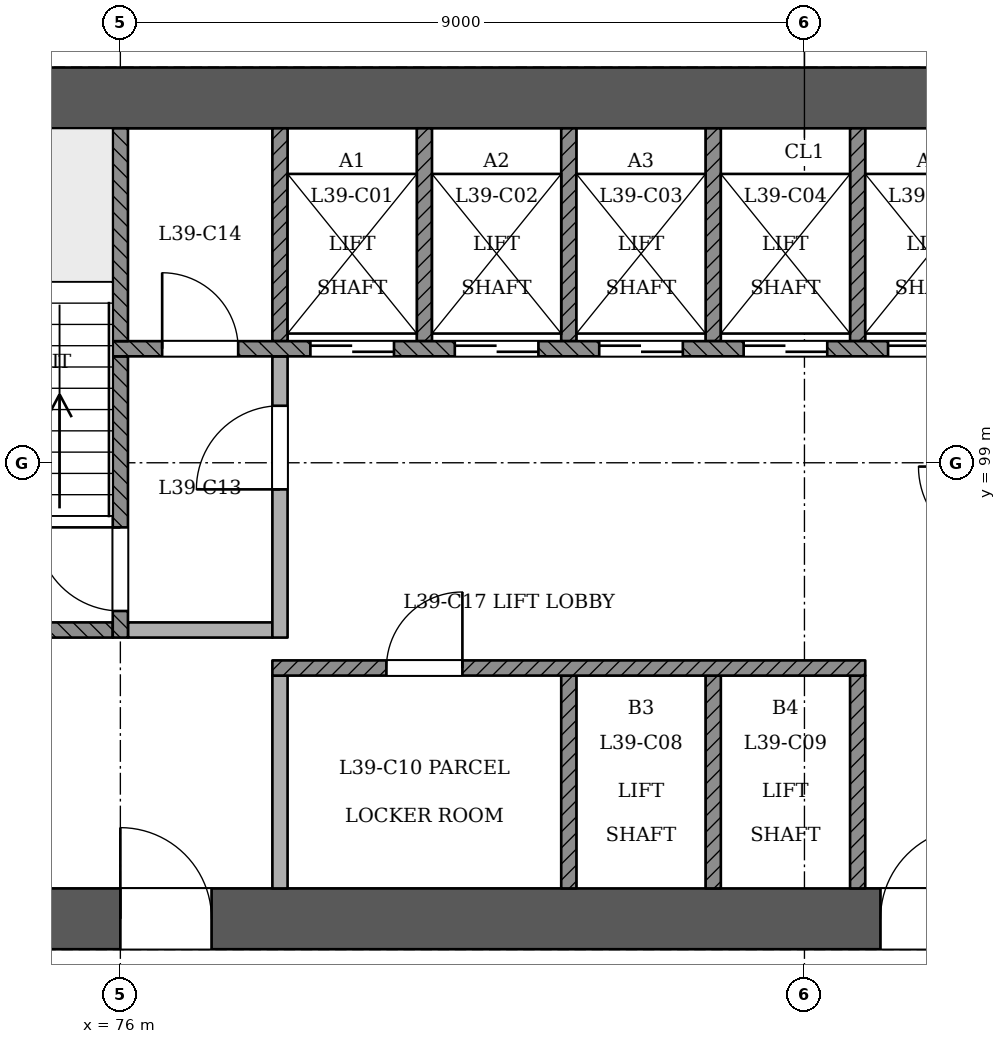
"""IFC4 building model, lengths in metres.
Left out: names, types, materials, properties, quantities, classifications, styles, units other than length and angle.
Written with IfcOpenShell. Run it as: python <this file> out.ifc"""

import sys

from ifc_helpers import new_model, si_unit, direction, frame, frame_2d, origin, place, context, subcontext, project, spatial, rectangle, extrude, element, fill, save


model = new_model("IFC4")
c1 = context("Model", 3, precision=1e-05, world=origin(), true_north=direction((0.0, 1.0)))
c2 = subcontext(c1, "Body", "Model", "MODEL_VIEW")
j1 = project(units=[si_unit("LENGTHUNIT", "METRE"), si_unit("PLANEANGLEUNIT", "RADIAN")], contexts=[c1])
p1 = place(None, origin())
s1 = spatial("IfcSite", under=j1, at=p1, CompositionType="ELEMENT")
p2 = place(p1, origin())
s2 = spatial("IfcBuilding", under=s1, at=p2, CompositionType="ELEMENT")
p3 = place(p2, frame((0.0, 0.0, 153.0)))
s3 = spatial("IfcBuildingStorey", under=s2, at=p3, CompositionType="ELEMENT", Elevation=153.0)
p4 = place(p3, frame((72.6, 93.0, 0.0), z_axis=(0.0, 0.0, 1.0), x_axis=(1.0, 0.0, 0.0)))
e1 = element("IfcWall", 1, at=p4, inside=s3, PredefinedType="SHEAR", context=c2, shape_type="SweptSolid", body=[
    extrude(rectangle(XDim=25.2, YDim=0.8, at=frame_2d((12.6, 0.0))), origin(), (0.0, 0.0, 1.0), 3.6),
])
p5 = place(p4, frame((1.2, 0.0, 0.0)))
e2 = element("IfcOpeningElement", 2, at=p5, cuts=e1, PredefinedType="OPENING", context=c2, shape_type="SweptSolid", body=[
    extrude(rectangle(XDim=1.2, YDim=2.1, at=frame_2d((0.6, 1.05))), frame((0.0, 0.411, 0.0), z_axis=(0.0, -1.0, 0.0), x_axis=(1.0, 0.0, 0.0)), (0.0, 0.0, 1.0), 0.821),
])
p6 = place(p4, frame((3.4, 0.0, 0.0)))
e3 = element("IfcOpeningElement", 3, at=p6, cuts=e1, PredefinedType="OPENING", context=c2, shape_type="SweptSolid", body=[
    extrude(rectangle(XDim=1.2, YDim=2.1, at=frame_2d((0.6, 1.05))), frame((0.0, 0.411, 0.0), z_axis=(0.0, -1.0, 0.0), x_axis=(1.0, 0.0, 0.0)), (0.0, 0.0, 1.0), 0.821),
])
p7 = place(p4, frame((13.4, 0.0, 0.0)))
e4 = element("IfcOpeningElement", 4, at=p7, cuts=e1, PredefinedType="OPENING", context=c2, shape_type="SweptSolid", body=[
    extrude(rectangle(XDim=1.2, YDim=2.1, at=frame_2d((0.6, 1.05))), frame((0.0, 0.411, 0.0), z_axis=(0.0, -1.0, 0.0), x_axis=(1.0, 0.0, 0.0)), (0.0, 0.0, 1.0), 0.821),
])
p8 = place(p4, frame((15.712, 0.0, 0.0)))
e5 = element("IfcOpeningElement", 5, at=p8, cuts=e1, PredefinedType="OPENING", context=c2, shape_type="SweptSolid", body=[
    extrude(rectangle(XDim=1.0, YDim=2.1, at=frame_2d((0.5, 1.05))), frame((0.0, 0.411, 0.0), z_axis=(0.0, -1.0, 0.0), x_axis=(1.0, 0.0, 0.0)), (0.0, 0.0, 1.0), 0.821),
])
p9 = place(p4, frame((19.15, 0.0, 0.0)))
e6 = element("IfcOpeningElement", 6, at=p9, cuts=e1, PredefinedType="OPENING", context=c2, shape_type="SweptSolid", body=[
    extrude(rectangle(XDim=1.0, YDim=2.1, at=frame_2d((0.5, 1.05))), frame((0.0, 0.411, 0.0), z_axis=(0.0, -1.0, 0.0), x_axis=(1.0, 0.0, 0.0)), (0.0, 0.0, 1.0), 0.821),
])
p10 = place(p4, frame((22.688, 0.0, 0.0)))
e7 = element("IfcOpeningElement", 7, at=p10, cuts=e1, PredefinedType="OPENING", context=c2, shape_type="SweptSolid", body=[
    extrude(rectangle(XDim=1.0, YDim=2.1, at=frame_2d((0.5, 1.05))), frame((0.0, 0.411, 0.0), z_axis=(0.0, -1.0, 0.0), x_axis=(1.0, 0.0, 0.0)), (0.0, 0.0, 1.0), 0.821),
])
p11 = place(p3, frame((97.4, 103.8, 0.0), z_axis=(0.0, 0.0, 1.0), x_axis=(-1.0, 0.0, 0.0)))
e8 = element("IfcWall", 8, at=p11, inside=s3, PredefinedType="SHEAR", context=c2, shape_type="SweptSolid", body=[
    extrude(rectangle(XDim=25.2, YDim=0.8, at=frame_2d((12.6, 0.0))), origin(), (0.0, 0.0, 1.0), 3.6),
])
p12 = place(p3, frame((66.242, 97.188, 0.0), z_axis=(0.0, 0.0, 1.0), x_axis=(0.500002614046, -0.866023894559, 0.0)))
e9 = element("IfcWall", 9, at=p12, inside=s3, PredefinedType="PARTITIONING", context=c2, shape_type="SweptSolid", body=[
    extrude(rectangle(XDim=37.515, YDim=0.15, at=frame_2d((18.758, 0.0))), origin(), (0.0, 0.0, 1.0), 2.75),
])
p13 = place(p12, frame((2.8, 0.0, 0.0)))
e10 = element("IfcOpeningElement", 10, at=p13, cuts=e9, PredefinedType="OPENING", context=c2, shape_type="SweptSolid", body=[
    extrude(rectangle(XDim=1.2, YDim=2.1, at=frame_2d((0.6, 1.05))), frame((0.0, 0.085, 0.0), z_axis=(0.0, -1.0, 0.0), x_axis=(1.0, 0.0, 0.0)), (0.0, 0.0, 1.0), 0.171),
])
p14 = place(p12, frame((11.8, 0.0, 0.0)))
e11 = element("IfcOpeningElement", 11, at=p14, cuts=e9, PredefinedType="OPENING", context=c2, shape_type="SweptSolid", body=[
    extrude(rectangle(XDim=1.2, YDim=2.1, at=frame_2d((0.6, 1.05))), frame((0.0, 0.085, 0.0), z_axis=(0.0, -1.0, 0.0), x_axis=(1.0, 0.0, 0.0)), (0.0, 0.0, 1.0), 0.171),
])
p15 = place(p12, frame((24.15, 0.0, 0.0)))
e12 = element("IfcOpeningElement", 12, at=p15, cuts=e9, PredefinedType="OPENING", context=c2, shape_type="SweptSolid", body=[
    extrude(rectangle(XDim=1.2, YDim=2.1, at=frame_2d((0.6, 1.05))), frame((0.0, 0.085, 0.0), z_axis=(0.0, -1.0, 0.0), x_axis=(1.0, 0.0, 0.0)), (0.0, 0.0, 1.0), 0.171),
])
p16 = place(p12, frame((33.25, 0.0, 0.0)))
e13 = element("IfcOpeningElement", 13, at=p16, cuts=e9, PredefinedType="OPENING", context=c2, shape_type="SweptSolid", body=[
    extrude(rectangle(XDim=1.0, YDim=2.1, at=frame_2d((0.5, 1.05))), frame((0.0, 0.085, 0.0), z_axis=(0.0, -1.0, 0.0), x_axis=(1.0, 0.0, 0.0)), (0.0, 0.0, 1.0), 0.171),
])
p17 = place(p3, frame((85.065, 64.811, 0.0), z_axis=(0.0, 0.0, 1.0), x_axis=(0.500003399299, 0.866023441189, 0.0)))
e14 = element("IfcWall", 14, at=p17, inside=s3, PredefinedType="PARTITIONING", context=c2, shape_type="SweptSolid", body=[
    extrude(rectangle(XDim=37.385, YDim=0.15, at=frame_2d((18.693, 0.0))), origin(), (0.0, 0.0, 1.0), 2.75),
])
p18 = place(p17, frame((0.524, 0.0, 0.0)))
e15 = element("IfcOpeningElement", 15, at=p18, cuts=e14, PredefinedType="OPENING", context=c2, shape_type="SweptSolid", body=[
    extrude(rectangle(XDim=1.2, YDim=2.1, at=frame_2d((0.6, 1.05))), frame((0.0, 0.085, 0.0), z_axis=(0.0, -1.0, 0.0), x_axis=(1.0, 0.0, 0.0)), (0.0, 0.0, 1.0), 0.171),
])
p19 = place(p17, frame((12.036, 0.0, 0.0)))
e16 = element("IfcOpeningElement", 16, at=p19, cuts=e14, PredefinedType="OPENING", context=c2, shape_type="SweptSolid", body=[
    extrude(rectangle(XDim=1.2, YDim=2.1, at=frame_2d((0.6, 1.05))), frame((0.0, 0.085, 0.0), z_axis=(0.0, -1.0, 0.0), x_axis=(1.0, 0.0, 0.0)), (0.0, 0.0, 1.0), 0.171),
])
p20 = place(p17, frame((22.186, 0.0, 0.0)))
e17 = element("IfcOpeningElement", 17, at=p20, cuts=e14, PredefinedType="OPENING", context=c2, shape_type="SweptSolid", body=[
    extrude(rectangle(XDim=1.2, YDim=2.1, at=frame_2d((0.6, 1.05))), frame((0.0, 0.085, 0.0), z_axis=(0.0, -1.0, 0.0), x_axis=(1.0, 0.0, 0.0)), (0.0, 0.0, 1.0), 0.171),
])
p21 = place(p17, frame((31.186, 0.0, 0.0)))
e18 = element("IfcOpeningElement", 18, at=p21, cuts=e14, PredefinedType="OPENING", context=c2, shape_type="SweptSolid", body=[
    extrude(rectangle(XDim=1.2, YDim=2.1, at=frame_2d((0.6, 1.05))), frame((0.0, 0.085, 0.0), z_axis=(0.0, -1.0, 0.0), x_axis=(1.0, 0.0, 0.0)), (0.0, 0.0, 1.0), 0.171),
])
p22 = place(p3, frame((78.1, 93.4, 0.0), z_axis=(0.0, 0.0, 1.0), x_axis=(0.0, 1.0, 0.0)))
e19 = element("IfcWall", 19, at=p22, inside=s3, PredefinedType="PARTITIONING", context=c2, shape_type="SweptSolid", body=[
    extrude(rectangle(XDim=2.8, YDim=0.2, at=frame_2d((1.4, 0.0))), origin(), (0.0, 0.0, 1.0), 3.15),
])
for number, where, z_axis, x_axis in (
    (20, (81.9, 93.4, 0.0), (0.0, 0.0, 1.0), (0.0, 1.0, 0.0)),
    (21, (83.8, 93.4, 0.0), (0.0, 0.0, 1.0), (0.0, 1.0, 0.0)),
    (22, (85.7, 93.4, 0.0), (0.0, 0.0, 1.0), (0.0, 1.0, 0.0)),
):
    element("IfcWall", number, at=place(p3, frame(where, z_axis=z_axis, x_axis=x_axis)), inside=s3, PredefinedType="SOLIDWALL", context=c2, shape_type="SweptSolid", body=[
        extrude(rectangle(XDim=2.8, YDim=0.2, at=frame_2d((1.4, 0.0))), origin(), (0.0, 0.0, 1.0), 3.15),
    ])
p23 = place(p3, frame((78.0, 96.3, 0.0), z_axis=(0.0, 0.0, 1.0), x_axis=(1.0, 0.0, 0.0)))
e23 = element("IfcWall", 23, at=p23, inside=s3, PredefinedType="SOLIDWALL", context=c2, shape_type="SweptSolid", body=[
    extrude(rectangle(XDim=7.8, YDim=0.2, at=frame_2d((3.9, 0.0))), origin(), (0.0, 0.0, 1.0), 3.15),
])
p24 = place(p23, frame((1.5, 0.0, 0.0)))
e24 = element("IfcOpeningElement", 24, at=p24, cuts=e23, PredefinedType="OPENING", context=c2, shape_type="SweptSolid", body=[
    extrude(rectangle(XDim=1.0, YDim=2.1, at=frame_2d((0.5, 1.05))), frame((0.0, 0.11, 0.0), z_axis=(0.0, -1.0, 0.0), x_axis=(1.0, 0.0, 0.0)), (0.0, 0.0, 1.0), 0.221),
])
p25 = place(p3, frame((73.0, 96.8, 0.0), z_axis=(0.0, 0.0, 1.0), x_axis=(1.0, 0.0, 0.0)))
e25 = element("IfcWall", 25, at=p25, inside=s3, PredefinedType="SOLIDWALL", context=c2, shape_type="SweptSolid", body=[
    extrude(rectangle(XDim=2.9, YDim=0.2, at=frame_2d((1.45, 0.0))), origin(), (0.0, 0.0, 1.0), 3.15),
])
p26 = place(p3, frame((76.0, 96.7, 0.0), z_axis=(0.0, 0.0, 1.0), x_axis=(0.0, 1.0, 0.0)))
e26 = element("IfcWall", 26, at=p26, inside=s3, PredefinedType="SOLIDWALL", context=c2, shape_type="SweptSolid", body=[
    extrude(rectangle(XDim=3.7, YDim=0.2, at=frame_2d((1.85, 0.0))), origin(), (0.0, 0.0, 1.0), 3.15),
])
p27 = place(p26, frame((0.35, 0.0, 0.0)))
e27 = element("IfcOpeningElement", 27, at=p27, cuts=e26, PredefinedType="OPENING", context=c2, shape_type="SweptSolid", body=[
    extrude(rectangle(XDim=1.1, YDim=2.1, at=frame_2d((0.55, 1.05))), frame((0.0, 0.11, 0.0), z_axis=(0.0, -1.0, 0.0), x_axis=(1.0, 0.0, 0.0)), (0.0, 0.0, 1.0), 0.221),
])
p28 = place(p3, frame((76.1, 96.8, 0.0), z_axis=(0.0, 0.0, 1.0), x_axis=(1.0, 0.0, 0.0)))
e28 = element("IfcWall", 28, at=p28, inside=s3, PredefinedType="PARTITIONING", context=c2, shape_type="SweptSolid", body=[
    extrude(rectangle(XDim=1.9, YDim=0.2, at=frame_2d((0.95, 0.0))), origin(), (0.0, 0.0, 1.0), 3.15),
])
p29 = place(p3, frame((78.1, 96.7, 0.0), z_axis=(0.0, 0.0, 1.0), x_axis=(0.0, 1.0, 0.0)))
e29 = element("IfcWall", 29, at=p29, inside=s3, PredefinedType="PARTITIONING", context=c2, shape_type="SweptSolid", body=[
    extrude(rectangle(XDim=3.7, YDim=0.2, at=frame_2d((1.85, 0.0))), origin(), (0.0, 0.0, 1.0), 3.15),
])
p30 = place(p29, frame((1.95, 0.0, 0.0)))
e30 = element("IfcOpeningElement", 30, at=p30, cuts=e29, PredefinedType="OPENING", context=c2, shape_type="SweptSolid", body=[
    extrude(rectangle(XDim=1.1, YDim=2.1, at=frame_2d((0.55, 1.05))), frame((0.0, 0.11, 0.0), z_axis=(0.0, -1.0, 0.0), x_axis=(1.0, 0.0, 0.0)), (0.0, 0.0, 1.0), 0.221),
])
p31 = place(p3, frame((75.9, 100.5, 0.0), z_axis=(0.0, 0.0, 1.0), x_axis=(1.0, 0.0, 0.0)))
e31 = element("IfcWall", 31, at=p31, inside=s3, PredefinedType="SOLIDWALL", context=c2, shape_type="SweptSolid", body=[
    extrude(rectangle(XDim=18.2, YDim=0.2, at=frame_2d((9.1, 0.0))), origin(), (0.0, 0.0, 1.0), 3.15),
])
p32 = place(p31, frame((2.6, 0.0, 0.0)))
e32 = element("IfcOpeningElement", 32, at=p32, cuts=e31, PredefinedType="OPENING", context=c2, shape_type="SweptSolid", body=[
    extrude(rectangle(XDim=1.1, YDim=2.1, at=frame_2d((0.55, 1.05))), frame((0.0, 0.11, 0.0), z_axis=(0.0, -1.0, 0.0), x_axis=(1.0, 0.0, 0.0)), (0.0, 0.0, 1.0), 0.221),
])
p33 = place(p31, frame((4.5, 0.0, 0.0)))
e33 = element("IfcOpeningElement", 33, at=p33, cuts=e31, PredefinedType="OPENING", context=c2, shape_type="SweptSolid", body=[
    extrude(rectangle(XDim=1.1, YDim=2.1, at=frame_2d((0.55, 1.05))), frame((0.0, 0.11, 0.0), z_axis=(0.0, -1.0, 0.0), x_axis=(1.0, 0.0, 0.0)), (0.0, 0.0, 1.0), 0.221),
])
p34 = place(p31, frame((6.4, 0.0, 0.0)))
e34 = element("IfcOpeningElement", 34, at=p34, cuts=e31, PredefinedType="OPENING", context=c2, shape_type="SweptSolid", body=[
    extrude(rectangle(XDim=1.1, YDim=2.1, at=frame_2d((0.55, 1.05))), frame((0.0, 0.11, 0.0), z_axis=(0.0, -1.0, 0.0), x_axis=(1.0, 0.0, 0.0)), (0.0, 0.0, 1.0), 0.221),
])
p35 = place(p31, frame((8.3, 0.0, 0.0)))
e35 = element("IfcOpeningElement", 35, at=p35, cuts=e31, PredefinedType="OPENING", context=c2, shape_type="SweptSolid", body=[
    extrude(rectangle(XDim=1.1, YDim=2.1, at=frame_2d((0.55, 1.05))), frame((0.0, 0.11, 0.0), z_axis=(0.0, -1.0, 0.0), x_axis=(1.0, 0.0, 0.0)), (0.0, 0.0, 1.0), 0.221),
])
p36 = place(p31, frame((10.2, 0.0, 0.0)))
e36 = element("IfcOpeningElement", 36, at=p36, cuts=e31, PredefinedType="OPENING", context=c2, shape_type="SweptSolid", body=[
    extrude(rectangle(XDim=1.1, YDim=2.1, at=frame_2d((0.55, 1.05))), frame((0.0, 0.11, 0.0), z_axis=(0.0, -1.0, 0.0), x_axis=(1.0, 0.0, 0.0)), (0.0, 0.0, 1.0), 0.221),
])
p37 = place(p31, frame((12.1, 0.0, 0.0)))
e37 = element("IfcOpeningElement", 37, at=p37, cuts=e31, PredefinedType="OPENING", context=c2, shape_type="SweptSolid", body=[
    extrude(rectangle(XDim=1.1, YDim=2.1, at=frame_2d((0.55, 1.05))), frame((0.0, 0.11, 0.0), z_axis=(0.0, -1.0, 0.0), x_axis=(1.0, 0.0, 0.0)), (0.0, 0.0, 1.0), 0.221),
])
p38 = place(p31, frame((14.0, 0.0, 0.0)))
e38 = element("IfcOpeningElement", 38, at=p38, cuts=e31, PredefinedType="OPENING", context=c2, shape_type="SweptSolid", body=[
    extrude(rectangle(XDim=1.1, YDim=2.1, at=frame_2d((0.55, 1.05))), frame((0.0, 0.11, 0.0), z_axis=(0.0, -1.0, 0.0), x_axis=(1.0, 0.0, 0.0)), (0.0, 0.0, 1.0), 0.221),
])
p39 = place(p31, frame((0.65, 0.0, 0.0)))
e39 = element("IfcOpeningElement", 39, at=p39, cuts=e31, PredefinedType="OPENING", context=c2, shape_type="SweptSolid", body=[
    extrude(rectangle(XDim=1.0, YDim=2.1, at=frame_2d((0.5, 1.05))), frame((0.0, 0.11, 0.0), z_axis=(0.0, -1.0, 0.0), x_axis=(1.0, 0.0, 0.0)), (0.0, 0.0, 1.0), 0.221),
])
p40 = place(p31, frame((16.3, 0.0, 0.0)))
e40 = element("IfcOpeningElement", 40, at=p40, cuts=e31, PredefinedType="OPENING", context=c2, shape_type="SweptSolid", body=[
    extrude(rectangle(XDim=1.0, YDim=2.1, at=frame_2d((0.5, 1.05))), frame((0.0, 0.11, 0.0), z_axis=(0.0, -1.0, 0.0), x_axis=(1.0, 0.0, 0.0)), (0.0, 0.0, 1.0), 0.221),
])
for number, where, z_axis, x_axis in (
    (41, (76.0, 100.6, 0.0), (0.0, 0.0, 1.0), (0.0, 1.0, 0.0)),
    (42, (78.1, 100.6, 0.0), (0.0, 0.0, 1.0), (0.0, 1.0, 0.0)),
    (43, (80.0, 100.6, 0.0), (0.0, 0.0, 1.0), (0.0, 1.0, 0.0)),
    (44, (81.9, 100.6, 0.0), (0.0, 0.0, 1.0), (0.0, 1.0, 0.0)),
    (45, (83.8, 100.6, 0.0), (0.0, 0.0, 1.0), (0.0, 1.0, 0.0)),
    (46, (85.7, 100.6, 0.0), (0.0, 0.0, 1.0), (0.0, 1.0, 0.0)),
):
    element("IfcWall", number, at=place(p3, frame(where, z_axis=z_axis, x_axis=x_axis)), inside=s3, PredefinedType="SOLIDWALL", context=c2, shape_type="SweptSolid", body=[
        extrude(rectangle(XDim=2.8, YDim=0.2, at=frame_2d((1.4, 0.0))), origin(), (0.0, 0.0, 1.0), 3.15),
    ])
p41 = place(p32, origin())
e47 = element("IfcDoor", 47, at=p41, inside=s3, OperationType="SLIDING_TO_RIGHT", PredefinedType="NOTDEFINED", context=c2, shape_type="SweptSolid", body=[
    extrude(rectangle(XDim=1.1, YDim=2.1, at=frame_2d((0.55, 1.05))), frame((0.0, 0.025, 0.0), z_axis=(0.0, -1.0, 0.0), x_axis=(1.0, 0.0, 0.0)), (0.0, 0.0, 1.0), 0.05),
])
fill(e32, e47)
p42 = place(p33, origin())
e48 = element("IfcDoor", 48, at=p42, inside=s3, OperationType="SLIDING_TO_LEFT", PredefinedType="NOTDEFINED", context=c2, shape_type="SweptSolid", body=[
    extrude(rectangle(XDim=1.1, YDim=2.1, at=frame_2d((0.55, 1.05))), frame((0.0, 0.025, 0.0), z_axis=(0.0, -1.0, 0.0), x_axis=(1.0, 0.0, 0.0)), (0.0, 0.0, 1.0), 0.05),
])
fill(e33, e48)
p43 = place(p34, origin())
e49 = element("IfcDoor", 49, at=p43, inside=s3, OperationType="SLIDING_TO_RIGHT", PredefinedType="NOTDEFINED", context=c2, shape_type="SweptSolid", body=[
    extrude(rectangle(XDim=1.1, YDim=2.1, at=frame_2d((0.55, 1.05))), frame((0.0, 0.025, 0.0), z_axis=(0.0, -1.0, 0.0), x_axis=(1.0, 0.0, 0.0)), (0.0, 0.0, 1.0), 0.05),
])
fill(e34, e49)
p44 = place(p35, origin())
e50 = element("IfcDoor", 50, at=p44, inside=s3, OperationType="SLIDING_TO_LEFT", PredefinedType="NOTDEFINED", context=c2, shape_type="SweptSolid", body=[
    extrude(rectangle(XDim=1.1, YDim=2.1, at=frame_2d((0.55, 1.05))), frame((0.0, 0.025, 0.0), z_axis=(0.0, -1.0, 0.0), x_axis=(1.0, 0.0, 0.0)), (0.0, 0.0, 1.0), 0.05),
])
fill(e35, e50)
p45 = place(p36, origin())
e51 = element("IfcDoor", 51, at=p45, inside=s3, OperationType="SLIDING_TO_RIGHT", PredefinedType="NOTDEFINED", context=c2, shape_type="SweptSolid", body=[
    extrude(rectangle(XDim=1.1, YDim=2.1, at=frame_2d((0.55, 1.05))), frame((0.0, 0.025, 0.0), z_axis=(0.0, -1.0, 0.0), x_axis=(1.0, 0.0, 0.0)), (0.0, 0.0, 1.0), 0.05),
])
fill(e36, e51)
p46 = place(p27, origin())
e52 = element("IfcDoor", 52, at=p46, inside=s3, OperationType="SINGLE_SWING_RIGHT", PredefinedType="NOTDEFINED", context=c2, shape_type="SweptSolid", body=[
    extrude(rectangle(XDim=1.1, YDim=2.1, at=frame_2d((0.55, 1.05))), frame((0.0, 0.025, 0.0), z_axis=(0.0, -1.0, 0.0), x_axis=(1.0, 0.0, 0.0)), (0.0, 0.0, 1.0), 0.05),
])
fill(e27, e52)
p47 = place(p30, origin())
e53 = element("IfcDoor", 53, at=p47, inside=s3, OperationType="SINGLE_SWING_LEFT", PredefinedType="NOTDEFINED", context=c2, shape_type="SweptSolid", body=[
    extrude(rectangle(XDim=1.1, YDim=2.1, at=frame_2d((0.55, 1.05))), frame((0.0, 0.025, 0.0), z_axis=(0.0, -1.0, 0.0), x_axis=(1.0, 0.0, 0.0)), (0.0, 0.0, 1.0), 0.05),
])
fill(e30, e53)
p48 = place(p6, origin())
e54 = element("IfcDoor", 54, at=p48, inside=s3, OperationType="SINGLE_SWING_LEFT", PredefinedType="NOTDEFINED", context=c2, shape_type="SweptSolid", body=[
    extrude(rectangle(XDim=1.2, YDim=2.1, at=frame_2d((0.6, 1.05))), frame((0.0, 0.025, 0.0), z_axis=(0.0, -1.0, 0.0), x_axis=(1.0, 0.0, 0.0)), (0.0, 0.0, 1.0), 0.05),
])
fill(e3, e54)
p49 = place(p7, origin())
e55 = element("IfcDoor", 55, at=p49, inside=s3, OperationType="SINGLE_SWING_RIGHT", PredefinedType="NOTDEFINED", context=c2, shape_type="SweptSolid", body=[
    extrude(rectangle(XDim=1.2, YDim=2.1, at=frame_2d((0.6, 1.05))), frame((0.0, 0.025, 0.0), z_axis=(0.0, -1.0, 0.0), x_axis=(1.0, 0.0, 0.0)), (0.0, 0.0, 1.0), 0.05),
])
fill(e4, e55)
p50 = place(p39, origin())
e56 = element("IfcDoor", 56, at=p50, inside=s3, OperationType="SINGLE_SWING_LEFT", PredefinedType="NOTDEFINED", context=c2, shape_type="SweptSolid", body=[
    extrude(rectangle(XDim=1.0, YDim=2.1, at=frame_2d((0.5, 1.05))), frame((0.0, 0.025, 0.0), z_axis=(0.0, -1.0, 0.0), x_axis=(1.0, 0.0, 0.0)), (0.0, 0.0, 1.0), 0.05),
])
fill(e39, e56)
p51 = place(p24, origin())
e57 = element("IfcDoor", 57, at=p51, inside=s3, OperationType="SINGLE_SWING_RIGHT", PredefinedType="NOTDEFINED", context=c2, shape_type="SweptSolid", body=[
    extrude(rectangle(XDim=1.0, YDim=2.1, at=frame_2d((0.5, 1.05))), frame((0.0, 0.025, 0.0), z_axis=(0.0, -1.0, 0.0), x_axis=(1.0, 0.0, 0.0)), (0.0, 0.0, 1.0), 0.05),
])
fill(e24, e57)
save(model, sys.argv[1])
